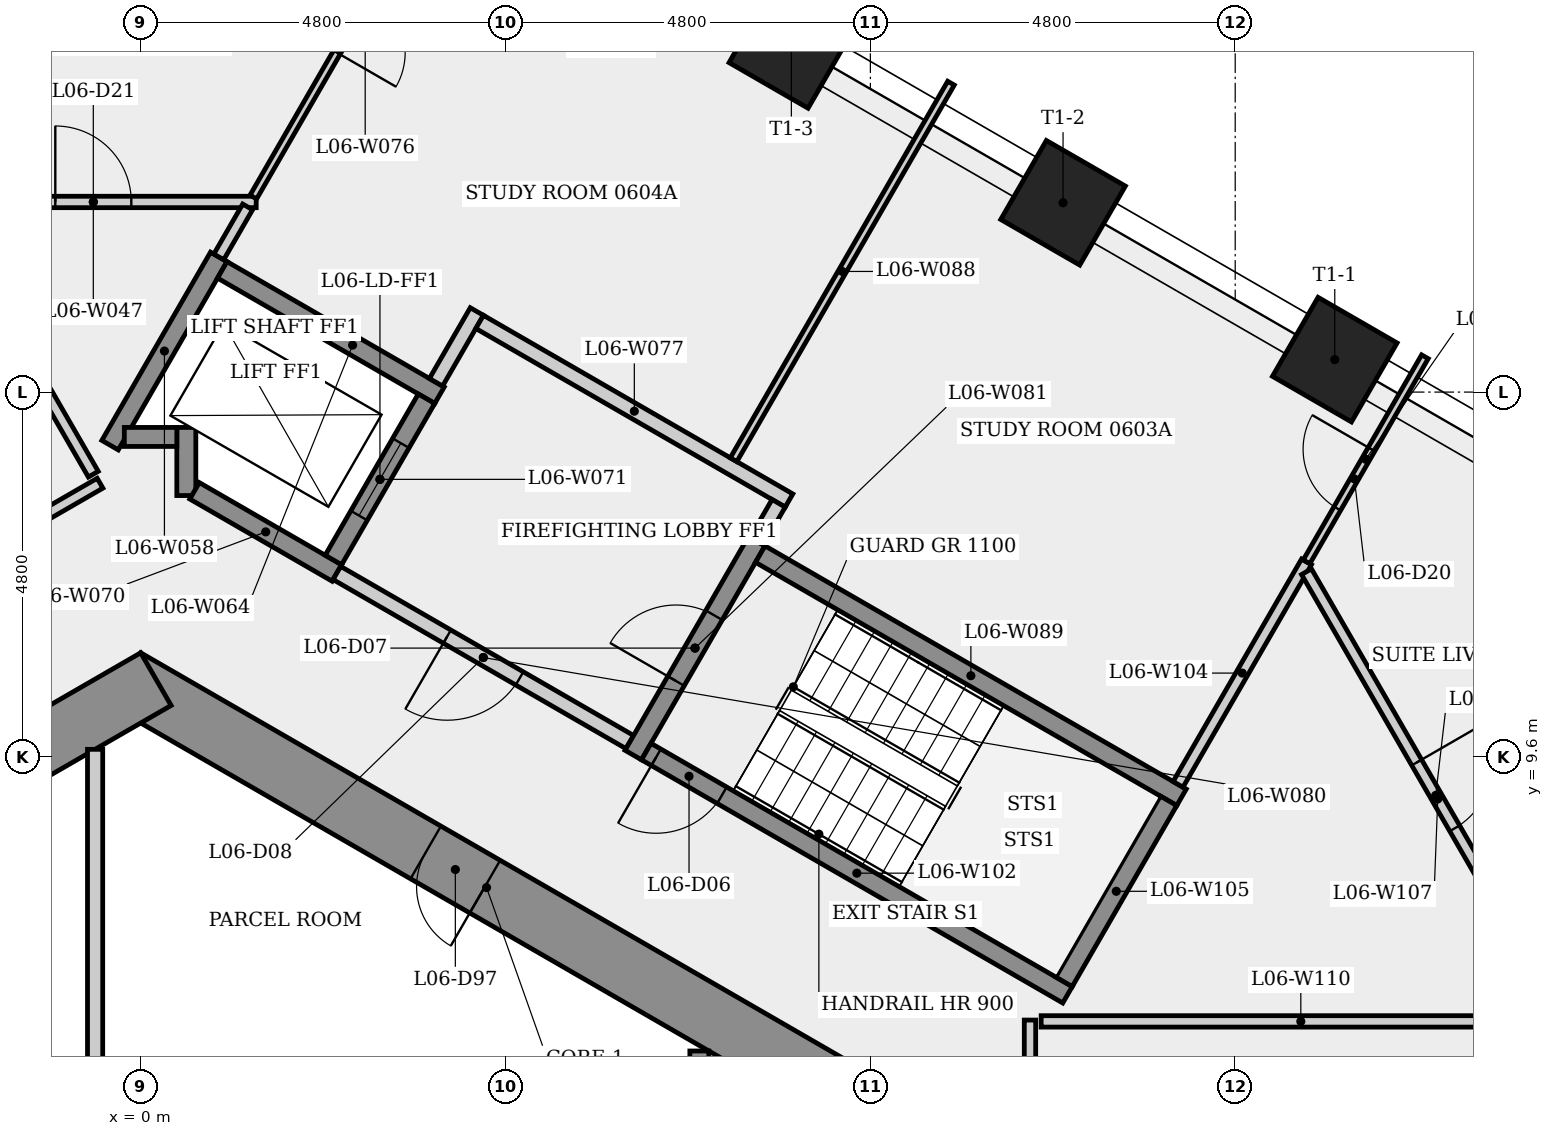
"""IFC4 building model, lengths in metres.
Left out: names, types, materials, properties, quantities, classifications, styles, units other than length and angle.
Written with IfcOpenShell. Run it as: python <this file> out.ifc"""

import sys

from ifc_helpers import new_model, si_unit, direction, frame, frame_2d, origin, origin_2d, place, context, subcontext, project, spatial, rectangle, extrude, element, fill, save


model = new_model("IFC4")
c1 = context("Model", 3, precision=1e-05, world=origin(), true_north=direction((0.0, 1.0)))
c2 = subcontext(c1, "Body", "Model", "MODEL_VIEW")
j1 = project(units=[si_unit("LENGTHUNIT", "METRE"), si_unit("PLANEANGLEUNIT", "RADIAN")], contexts=[c1])
p1 = place(None, origin())
s1 = spatial("IfcSite", under=j1, at=p1, CompositionType="ELEMENT")
p2 = place(p1, origin())
s2 = spatial("IfcBuilding", under=s1, at=p2, CompositionType="ELEMENT")
p3 = place(p2, frame((0.0, 0.0, 28.9)))
s3 = spatial("IfcBuildingStorey", under=s2, at=p3, CompositionType="ELEMENT", Elevation=28.9)
p4 = place(p3, frame((9.3, 5.138, 0.0), z_axis=(0.0, 0.0, 1.0), x_axis=(-0.866023993627, 0.500002442456, 0.0)))
e1 = element("IfcWall", 1, at=p4, inside=s3, PredefinedType="SHEAR", context=c2, shape_type="SweptSolid", body=[
    extrude(rectangle(XDim=10.97, YDim=0.8, at=frame_2d((5.485, 0.0))), origin(), (0.0, 0.0, 1.0), 3.4),
])
p5 = place(p4, frame((5.509, 0.0, 0.0)))
e2 = element("IfcOpeningElement", 2, at=p5, cuts=e1, PredefinedType="OPENING", context=c2, shape_type="SweptSolid", body=[
    extrude(rectangle(XDim=0.9, YDim=2.1, at=frame_2d((0.45, 1.05))), frame((0.0, 0.41, 0.0), z_axis=(0.0, -1.0, 0.0), x_axis=(1.0, 0.0, 0.0)), (0.0, 0.0, 1.0), 0.82),
])
p6 = place(p3, frame((0.2, 10.623, 0.0), z_axis=(0.0, 0.0, 1.0), x_axis=(-0.866023993627, -0.500002442456, 0.0)))
e3 = element("IfcWall", 3, at=p6, inside=s3, PredefinedType="SHEAR", context=c2, shape_type="SweptSolid", body=[
    extrude(rectangle(XDim=10.97, YDim=0.8, at=frame_2d((5.485, 0.0))), origin(), (0.0, 0.0, 1.0), 3.4),
])
p7 = place(p6, frame((6.993, 0.0, 0.0)))
e4 = element("IfcOpeningElement", 4, at=p7, cuts=e3, PredefinedType="OPENING", context=c2, shape_type="SweptSolid", body=[
    extrude(rectangle(XDim=0.9, YDim=2.1, at=frame_2d((0.45, 1.05))), frame((0.0, 0.41, 0.0), z_axis=(0.0, -1.0, 0.0), x_axis=(1.0, 0.0, 0.0)), (0.0, 0.0, 1.0), 0.82),
])
for number, where, z_axis, x_axis in (
    (5, (15.71, 14.827, 0.0), (0.0, 0.0, 1.0), (0.5, 0.866, 0.0)),
    (6, (12.135, 16.891, 0.0), (0.0, 0.0, 1.0), (0.5, 0.866, 0.0)),
    (7, (8.561, 18.955, 0.0), (0.0, 0.0, 1.0), (0.5, 0.866, 0.0)),
):
    element("IfcColumn", number, at=place(p3, frame(where, z_axis=z_axis, x_axis=x_axis)), inside=s3, PredefinedType="COLUMN", context=c2, shape_type="SweptSolid", body=[
        extrude(rectangle(XDim=1.2, YDim=1.2, at=origin_2d()), origin(), (0.0, 0.0, 1.0), 3.4),
    ])
p8 = place(p3, frame((-10.825, 7.26, 0.0), z_axis=(0.0, 0.0, 1.0), x_axis=(0.866026819738, 0.499997547488, 0.0)))
e8 = element("IfcWall", 8, at=p8, inside=s3, PredefinedType="PARTITIONING", context=c2, shape_type="SweptSolid", body=[
    extrude(rectangle(XDim=11.882, YDim=0.15, at=frame_2d((5.941, 0.0))), origin(), (0.0, 0.0, 1.0), 3.05),
])
p9 = place(p8, frame((5.403, 0.0, 0.0)))
e9 = element("IfcOpeningElement", 9, at=p9, cuts=e8, PredefinedType="OPENING", context=c2, shape_type="SweptSolid", body=[
    extrude(rectangle(XDim=1.0, YDim=2.1, at=frame_2d((0.5, 1.05))), frame((0.0, 0.085, 0.0), z_axis=(0.0, -1.0, 0.0), x_axis=(1.0, 0.0, 0.0)), (0.0, 0.0, 1.0), 0.17),
])
p10 = place(p3, frame((-2.767, 16.902, 0.0), z_axis=(0.0, 0.0, 1.0), x_axis=(1.0, 0.0, 0.0)))
e10 = element("IfcWall", 10, at=p10, inside=s3, PredefinedType="PARTITIONING", context=c2, shape_type="SweptSolid", body=[
    extrude(rectangle(XDim=4.286, YDim=0.15, at=frame_2d((2.143, 0.0))), origin(), (0.0, 0.0, 1.0), 3.05),
])
p11 = place(p10, frame((1.643, 0.0, 0.0)))
e11 = element("IfcOpeningElement", 11, at=p11, cuts=e10, PredefinedType="OPENING", context=c2, shape_type="SweptSolid", body=[
    extrude(rectangle(XDim=1.0, YDim=2.1, at=frame_2d((0.5, 1.05))), frame((0.0, 0.085, 0.0), z_axis=(0.0, -1.0, 0.0), x_axis=(1.0, 0.0, 0.0)), (0.0, 0.0, 1.0), 0.17),
])
p12 = place(p3, frame((-0.624, 13.32, 0.0), z_axis=(0.0, 0.0, 1.0), x_axis=(-0.499986114097, 0.866033420666, 0.0)))
e12 = element("IfcWall", 12, at=p12, inside=s3, PredefinedType="PARTITIONING", context=c2, shape_type="SweptSolid", body=[
    extrude(rectangle(XDim=4.061, YDim=0.15, at=frame_2d((2.031, 0.0))), origin(), (0.0, 0.0, 1.0), 3.05),
])
p13 = place(p3, frame((-0.6, 9.699, 0.0), z_axis=(0.0, 0.0, 1.0), x_axis=(0.0, -1.0, 0.0)))
e13 = element("IfcWall", 13, at=p13, inside=s3, PredefinedType="PARTITIONING", context=c2, shape_type="SweptSolid", body=[
    extrude(rectangle(XDim=4.425, YDim=0.2, at=frame_2d((2.212, 0.0))), origin(), (0.0, 0.0, 1.0), 3.05),
])
p14 = place(p3, frame((-0.403, 13.702, 0.0), z_axis=(0.0, 0.0, 1.0), x_axis=(0.499976111731, 0.866039195244, 0.0)))
e14 = element("IfcWall", 14, at=p14, inside=s3, PredefinedType="SHEAR", context=c2, shape_type="SweptSolid", body=[
    extrude(rectangle(XDim=2.861, YDim=0.25, at=frame_2d((1.43, 0.0))), origin(), (0.0, 0.0, 1.0), 3.05),
])
p15 = place(p3, frame((0.6, 13.039, 0.0), z_axis=(0.0, 0.0, 1.0), x_axis=(0.0, 1.0, 0.0)))
e15 = element("IfcWall", 15, at=p15, inside=s3, PredefinedType="SHEAR", context=c2, shape_type="SweptSolid", body=[
    extrude(rectangle(XDim=0.896, YDim=0.25, at=frame_2d((0.448, 0.0))), origin(), (0.0, 0.0, 1.0), 3.05),
])
p16 = place(p3, frame((0.475, 13.81, 0.0), z_axis=(0.0, 0.0, 1.0), x_axis=(-1.0, 0.0, 0.0)))
e16 = element("IfcWall", 16, at=p16, inside=s3, PredefinedType="SHEAR", context=c2, shape_type="SweptSolid", body=[
    extrude(rectangle(XDim=0.691, YDim=0.25, at=frame_2d((0.345, 0.0))), origin(), (0.0, 0.0, 1.0), 3.4),
])
p17 = place(p3, frame((1.073, 16.008, 0.0), z_axis=(0.0, 0.0, 1.0), x_axis=(0.866040211805, -0.499974350878, 0.0)))
e17 = element("IfcWall", 17, at=p17, inside=s3, PredefinedType="SHEAR", context=c2, shape_type="SweptSolid", body=[
    extrude(rectangle(XDim=3.3, YDim=0.25, at=frame_2d((1.65, 0.0))), origin(), (0.0, 0.0, 1.0), 3.05),
])
p18 = place(p3, frame((1.407, 16.837, 0.0), z_axis=(0.0, 0.0, 1.0), x_axis=(-0.499907982315, -0.866078523702, 0.0)))
e18 = element("IfcWall", 18, at=p18, inside=s3, PredefinedType="PARTITIONING", context=c2, shape_type="SweptSolid", body=[
    extrude(rectangle(XDim=0.76, YDim=0.15, at=frame_2d((0.38, 0.0))), origin(), (0.0, 0.0, 1.0), 3.05),
])
p19 = place(p3, frame((2.581, 12.02, 0.0), z_axis=(0.0, 0.0, 1.0), x_axis=(-0.86603892542, 0.499976579108, 0.0)))
e19 = element("IfcWall", 19, at=p19, inside=s3, PredefinedType="SHEAR", context=c2, shape_type="SweptSolid", body=[
    extrude(rectangle(XDim=2.162, YDim=0.25, at=frame_2d((1.081, 0.0))), origin(), (0.0, 0.0, 1.0), 3.05),
])
p20 = place(p3, frame((2.535, 12.191, 0.0), z_axis=(0.0, 0.0, 1.0), x_axis=(0.500061746146, 0.865989751695, 0.0)))
e20 = element("IfcWall", 20, at=p20, inside=s3, PredefinedType="SHEAR", context=c2, shape_type="SweptSolid", body=[
    extrude(rectangle(XDim=2.45, YDim=0.25, at=frame_2d((1.225, 0.0))), origin(), (0.0, 0.0, 1.0), 3.4),
])
p21 = place(p20, frame((0.675, 0.0, 0.0)))
e21 = element("IfcOpeningElement", 21, at=p21, cuts=e20, PredefinedType="OPENING", context=c2, shape_type="SweptSolid", body=[
    extrude(rectangle(XDim=1.1, YDim=2.1, at=frame_2d((0.55, 1.05))), frame((0.0, 0.135, 0.0), z_axis=(0.0, -1.0, 0.0), x_axis=(1.0, 0.0, 0.0)), (0.0, 0.0, 1.0), 0.27),
])
p22 = place(p3, frame((3.885, 14.529, 0.0), z_axis=(0.0, 0.0, 1.0), x_axis=(0.499997628298, 0.866026773083, 0.0)))
e22 = element("IfcWall", 22, at=p22, inside=s3, PredefinedType="PARTITIONING", context=c2, shape_type="SweptSolid", body=[
    extrude(rectangle(XDim=1.075, YDim=0.2, at=frame_2d((0.538, 0.0))), origin(), (0.0, 0.0, 1.0), 3.05),
])
p23 = place(p3, frame((4.425, 22.065, 0.0), z_axis=(0.0, 0.0, 1.0), x_axis=(-0.500024001918, -0.866011545827, 0.0)))
e23 = element("IfcWall", 23, at=p23, inside=s3, PredefinedType="PARTITIONING", context=c2, shape_type="SweptSolid", body=[
    extrude(rectangle(XDim=5.887, YDim=0.1, at=frame_2d((2.943, 0.0))), origin(), (0.0, 0.0, 1.0), 3.05),
])
p24 = place(p23, frame((2.792, 0.0, 0.0)))
e24 = element("IfcOpeningElement", 24, at=p24, cuts=e23, PredefinedType="OPENING", context=c2, shape_type="SweptSolid", body=[
    extrude(rectangle(XDim=0.9, YDim=2.1, at=frame_2d((0.45, 1.05))), frame((0.0, 0.06, 0.0), z_axis=(0.0, -1.0, 0.0), x_axis=(1.0, 0.0, 0.0)), (0.0, 0.0, 1.0), 0.12),
])
p25 = place(p3, frame((4.459, 15.323, 0.0), z_axis=(0.0, 0.0, 1.0), x_axis=(0.866016039709, -0.500016218704, 0.0)))
e25 = element("IfcWall", 25, at=p25, inside=s3, PredefinedType="PARTITIONING", context=c2, shape_type="SweptSolid", body=[
    extrude(rectangle(XDim=4.7, YDim=0.2, at=frame_2d((2.35, 0.0))), origin(), (0.0, 0.0, 1.0), 3.05),
])
p26 = place(p3, frame((6.435, 9.795, 0.0), z_axis=(0.0, 0.0, 1.0), x_axis=(-0.866012907634, 0.500021643343, 0.0)))
e26 = element("IfcWall", 26, at=p26, inside=s3, PredefinedType="PARTITIONING", context=c2, shape_type="SweptSolid", body=[
    extrude(rectangle(XDim=4.45, YDim=0.2, at=frame_2d((2.225, 0.0))), origin(), (0.0, 0.0, 1.0), 3.05),
])
p27 = place(p26, frame((1.675, 0.0, 0.0)))
e27 = element("IfcOpeningElement", 27, at=p27, cuts=e26, PredefinedType="OPENING", context=c2, shape_type="SweptSolid", body=[
    extrude(rectangle(XDim=1.1, YDim=2.1, at=frame_2d((0.55, 1.05))), frame((0.0, 0.11, 0.0), z_axis=(0.0, -1.0, 0.0), x_axis=(1.0, 0.0, 0.0)), (0.0, 0.0, 1.0), 0.22),
])
p28 = place(p3, frame((6.48, 9.624, 0.0), z_axis=(0.0, 0.0, 1.0), x_axis=(0.500017246033, 0.866015446554, 0.0)))
e28 = element("IfcWall", 28, at=p28, inside=s3, PredefinedType="SHEAR", context=c2, shape_type="SweptSolid", body=[
    extrude(rectangle(XDim=3.25, YDim=0.25, at=frame_2d((1.625, 0.0))), origin(), (0.0, 0.0, 1.0), 3.05),
])
p29 = place(p28, frame((1.125, 0.0, 0.0)))
e29 = element("IfcOpeningElement", 29, at=p29, cuts=e28, PredefinedType="OPENING", context=c2, shape_type="SweptSolid", body=[
    extrude(rectangle(XDim=1.0, YDim=2.1, at=frame_2d((0.5, 1.05))), frame((0.0, 0.135, 0.0), z_axis=(0.0, -1.0, 0.0), x_axis=(1.0, 0.0, 0.0)), (0.0, 0.0, 1.0), 0.27),
])
p30 = place(p3, frame((7.35, 5.73, 0.0), z_axis=(0.0, 0.0, 1.0), x_axis=(0.0, -1.0, 0.0)))
e30 = element("IfcWall", 30, at=p30, inside=s3, PredefinedType="SHEAR", context=c2, shape_type="SweptSolid", body=[
    extrude(rectangle(XDim=3.805, YDim=0.25, at=frame_2d((1.903, 0.0))), origin(), (0.0, 0.0, 1.0), 3.05),
])
p31 = place(p3, frame((7.8, 13.51, 0.0), z_axis=(0.0, 0.0, 1.0), x_axis=(0.499989639809, 0.866031385161, 0.0)))
e31 = element("IfcWall", 31, at=p31, inside=s3, PredefinedType="PARTITIONING", context=c2, shape_type="SweptSolid", body=[
    extrude(rectangle(XDim=5.721, YDim=0.1, at=frame_2d((2.861, 0.0))), origin(), (0.0, 0.0, 1.0), 3.05),
])
p32 = place(p3, frame((8.151, 12.268, 0.0), z_axis=(0.0, 0.0, 1.0), x_axis=(0.866025499775, -0.499999833739, 0.0)))
e32 = element("IfcWall", 32, at=p32, inside=s3, PredefinedType="SHEAR", context=c2, shape_type="SweptSolid", body=[
    extrude(rectangle(XDim=6.4, YDim=0.25, at=frame_2d((3.2, 0.0))), origin(), (0.0, 0.0, 1.0), 3.05),
])
p33 = place(p3, frame((8.393, 12.937, 0.0), z_axis=(0.0, 0.0, 1.0), x_axis=(-0.500065409566, -0.86598763626, 0.0)))
e33 = element("IfcWall", 33, at=p33, inside=s3, PredefinedType="PARTITIONING", context=c2, shape_type="SweptSolid", body=[
    extrude(rectangle(XDim=0.575, YDim=0.2, at=frame_2d((0.288, 0.0))), origin(), (0.0, 0.0, 1.0), 3.05),
])
p34 = place(p3, frame((11.7, -5.987, 0.0), z_axis=(0.0, 0.0, 1.0), x_axis=(0.0, 1.0, 0.0)))
e34 = element("IfcWall", 34, at=p34, inside=s3, PredefinedType="PARTITIONING", context=c2, shape_type="SweptSolid", body=[
    extrude(rectangle(XDim=12.125, YDim=0.15, at=frame_2d((6.062, 0.0))), origin(), (0.0, 0.0, 1.0), 3.05),
])
p35 = place(p34, frame((7.513, 0.0, 0.0)))
e35 = element("IfcOpeningElement", 35, at=p35, cuts=e34, PredefinedType="OPENING", context=c2, shape_type="SweptSolid", body=[
    extrude(rectangle(XDim=1.0, YDim=2.1, at=frame_2d((0.5, 1.05))), frame((0.0, 0.085, 0.0), z_axis=(0.0, -1.0, 0.0), x_axis=(1.0, 0.0, 0.0)), (0.0, 0.0, 1.0), 0.17),
])
p36 = place(p3, frame((12.194, 6.47, 0.0), z_axis=(0.0, 0.0, 1.0), x_axis=(-0.866025499775, 0.499999833739, 0.0)))
e36 = element("IfcWall", 36, at=p36, inside=s3, PredefinedType="SHEAR", context=c2, shape_type="SweptSolid", body=[
    extrude(rectangle(XDim=6.4, YDim=0.25, at=frame_2d((3.2, 0.0))), origin(), (0.0, 0.0, 1.0), 3.05),
])
p37 = place(p36, frame((5.25, 0.0, 0.0)))
e37 = element("IfcOpeningElement", 37, at=p37, cuts=e36, PredefinedType="OPENING", context=c2, shape_type="SweptSolid", body=[
    extrude(rectangle(XDim=1.0, YDim=2.1, at=frame_2d((0.5, 1.05))), frame((0.0, 0.135, 0.0), z_axis=(0.0, -1.0, 0.0), x_axis=(1.0, 0.0, 0.0)), (0.0, 0.0, 1.0), 0.27),
])
p38 = place(p3, frame((13.648, 9.239, 0.0), z_axis=(0.0, 0.0, 1.0), x_axis=(0.500022507987, 0.866012408402, 0.0)))
e38 = element("IfcWall", 38, at=p38, inside=s3, PredefinedType="PARTITIONING", context=c2, shape_type="SweptSolid", body=[
    extrude(rectangle(XDim=3.381, YDim=0.15, at=frame_2d((1.69, 0.0))), origin(), (0.0, 0.0, 1.0), 3.05),
])
p39 = place(p3, frame((13.523, 9.022, 0.0), z_axis=(0.0, 0.0, 1.0), x_axis=(-0.500034990121, -0.866005201286, 0.0)))
e39 = element("IfcWall", 39, at=p39, inside=s3, PredefinedType="SHEAR", context=c2, shape_type="SweptSolid", body=[
    extrude(rectangle(XDim=2.75, YDim=0.25, at=frame_2d((1.375, 0.0))), origin(), (0.0, 0.0, 1.0), 3.05),
])
p40 = place(p3, frame((15.338, 12.167, 0.0), z_axis=(0.0, 0.0, 1.0), x_axis=(0.500007335828, 0.866021168401, 0.0)))
e40 = element("IfcWall", 40, at=p40, inside=s3, PredefinedType="PARTITIONING", context=c2, shape_type="SweptSolid", body=[
    extrude(rectangle(XDim=3.116, YDim=0.1, at=frame_2d((1.558, 0.0))), origin(), (0.0, 0.0, 1.0), 3.05),
])
p41 = place(p40, frame((0.81, 0.0, 0.0)))
e41 = element("IfcOpeningElement", 41, at=p41, cuts=e40, PredefinedType="OPENING", context=c2, shape_type="SweptSolid", body=[
    extrude(rectangle(XDim=0.9, YDim=2.1, at=frame_2d((0.45, 1.05))), frame((0.0, 0.06, 0.0), z_axis=(0.0, -1.0, 0.0), x_axis=(1.0, 0.0, 0.0)), (0.0, 0.0, 1.0), 0.12),
])
p42 = place(p3, frame((15.338, 12.037, 0.0), z_axis=(0.0, 0.0, 1.0), x_axis=(0.500020244489, -0.866013715308, 0.0)))
e42 = element("IfcWall", 42, at=p42, inside=s3, PredefinedType="PARTITIONING", context=c2, shape_type="SweptSolid", body=[
    extrude(rectangle(XDim=6.907, YDim=0.15, at=frame_2d((3.454, 0.0))), origin(), (0.0, 0.0, 1.0), 3.05),
])
p43 = place(p42, frame((2.899, 0.0, 0.0)))
e43 = element("IfcOpeningElement", 43, at=p43, cuts=e42, PredefinedType="OPENING", context=c2, shape_type="SweptSolid", body=[
    extrude(rectangle(XDim=1.0, YDim=2.1, at=frame_2d((0.5, 1.05))), frame((0.0, 0.085, 0.0), z_axis=(0.0, -1.0, 0.0), x_axis=(1.0, 0.0, 0.0)), (0.0, 0.0, 1.0), 0.17),
])
p44 = place(p3, frame((18.679, 6.12, 0.0), z_axis=(0.0, 0.0, 1.0), x_axis=(-1.0, 0.0, 0.0)))
e44 = element("IfcWall", 44, at=p44, inside=s3, PredefinedType="PARTITIONING", context=c2, shape_type="SweptSolid", body=[
    extrude(rectangle(XDim=6.833, YDim=0.15, at=frame_2d((3.416, 0.0))), origin(), (0.0, 0.0, 1.0), 3.05),
])
p45 = place(p37, origin())
e45 = element("IfcDoor", 45, at=p45, inside=s3, OperationType="SINGLE_SWING_RIGHT", PredefinedType="DOOR", context=c2, shape_type="SweptSolid", body=[
    extrude(rectangle(XDim=1.0, YDim=2.1, at=frame_2d((0.5, 1.05))), frame((0.0, 0.025, 0.0), z_axis=(0.0, -1.0, 0.0), x_axis=(1.0, 0.0, 0.0)), (0.0, 0.0, 1.0), 0.05),
])
fill(e37, e45)
p46 = place(p29, origin())
e46 = element("IfcDoor", 46, at=p46, inside=s3, OperationType="SINGLE_SWING_LEFT", PredefinedType="DOOR", context=c2, shape_type="SweptSolid", body=[
    extrude(rectangle(XDim=1.0, YDim=2.1, at=frame_2d((0.5, 1.05))), frame((0.0, 0.025, 0.0), z_axis=(0.0, -1.0, 0.0), x_axis=(1.0, 0.0, 0.0)), (0.0, 0.0, 1.0), 0.05),
])
fill(e29, e46)
p47 = place(p27, origin())
e47 = element("IfcDoor", 47, at=p47, inside=s3, OperationType="SINGLE_SWING_RIGHT", PredefinedType="DOOR", context=c2, shape_type="SweptSolid", body=[
    extrude(rectangle(XDim=1.1, YDim=2.1, at=frame_2d((0.55, 1.05))), frame((0.0, 0.025, 0.0), z_axis=(0.0, -1.0, 0.0), x_axis=(1.0, 0.0, 0.0)), (0.0, 0.0, 1.0), 0.05),
])
fill(e27, e47)
p48 = place(p21, origin())
e48 = element("IfcDoor", 48, at=p48, inside=s3, OperationType="SLIDING_TO_LEFT", PredefinedType="DOOR", context=c2, shape_type="SweptSolid", body=[
    extrude(rectangle(XDim=1.1, YDim=2.1, at=frame_2d((0.55, 1.05))), frame((0.0, 0.025, 0.0), z_axis=(0.0, -1.0, 0.0), x_axis=(1.0, 0.0, 0.0)), (0.0, 0.0, 1.0), 0.05),
])
fill(e21, e48)
p49 = place(p43, origin())
e49 = element("IfcDoor", 49, at=p49, inside=s3, OperationType="SINGLE_SWING_LEFT", PredefinedType="DOOR", context=c2, shape_type="SweptSolid", body=[
    extrude(rectangle(XDim=1.0, YDim=2.1, at=frame_2d((0.5, 1.05))), frame((0.0, 0.025, 0.0), z_axis=(0.0, -1.0, 0.0), x_axis=(1.0, 0.0, 0.0)), (0.0, 0.0, 1.0), 0.05),
])
fill(e43, e49)
p50 = place(p41, origin())
e50 = element("IfcDoor", 50, at=p50, inside=s3, OperationType="SINGLE_SWING_RIGHT", PredefinedType="DOOR", context=c2, shape_type="SweptSolid", body=[
    extrude(rectangle(XDim=0.9, YDim=2.1, at=frame_2d((0.45, 1.05))), frame((0.0, 0.025, 0.0), z_axis=(0.0, -1.0, 0.0), x_axis=(1.0, 0.0, 0.0)), (0.0, 0.0, 1.0), 0.05),
])
fill(e41, e50)
p51 = place(p11, origin())
e51 = element("IfcDoor", 51, at=p51, inside=s3, OperationType="SINGLE_SWING_LEFT", PredefinedType="DOOR", context=c2, shape_type="SweptSolid", body=[
    extrude(rectangle(XDim=1.0, YDim=2.1, at=frame_2d((0.5, 1.05))), frame((0.0, 0.025, 0.0), z_axis=(0.0, -1.0, 0.0), x_axis=(1.0, 0.0, 0.0)), (0.0, 0.0, 1.0), 0.05),
])
fill(e11, e51)
p52 = place(p24, origin())
e52 = element("IfcDoor", 52, at=p52, inside=s3, OperationType="SINGLE_SWING_RIGHT", PredefinedType="DOOR", context=c2, shape_type="SweptSolid", body=[
    extrude(rectangle(XDim=0.9, YDim=2.1, at=frame_2d((0.45, 1.05))), frame((0.0, 0.025, 0.0), z_axis=(0.0, -1.0, 0.0), x_axis=(1.0, 0.0, 0.0)), (0.0, 0.0, 1.0), 0.05),
])
fill(e24, e52)
p53 = place(p5, origin())
e53 = element("IfcDoor", 53, at=p53, inside=s3, OperationType="SINGLE_SWING_LEFT", PredefinedType="DOOR", context=c2, shape_type="SweptSolid", body=[
    extrude(rectangle(XDim=0.9, YDim=2.1, at=frame_2d((0.45, 1.05))), frame((0.0, 0.025, 0.0), z_axis=(0.0, -1.0, 0.0), x_axis=(1.0, 0.0, 0.0)), (0.0, 0.0, 1.0), 0.05),
])
fill(e2, e53)
save(model, sys.argv[1])
